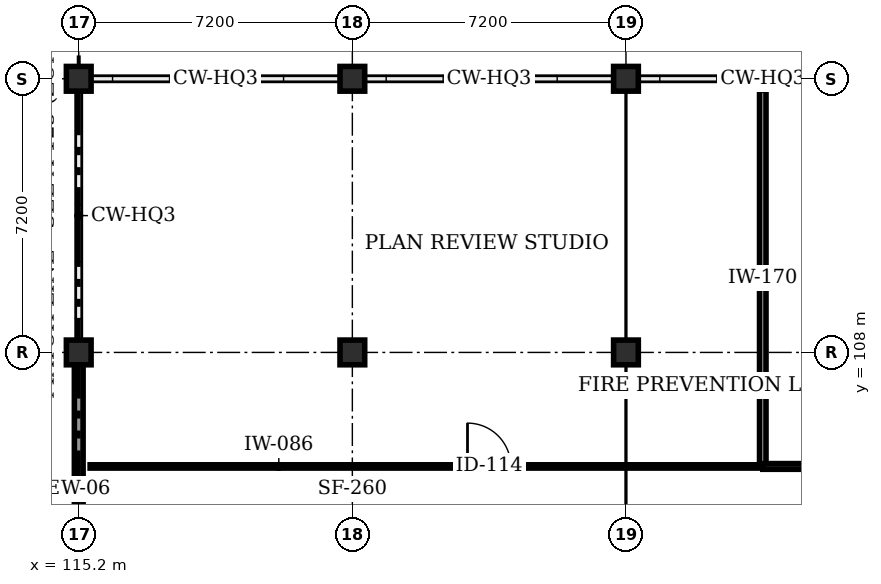
"""IFC4 building model, lengths in metres.
Left out: names, types, materials, properties, quantities, classifications, styles, units other than length and angle.
Written with IfcOpenShell. Run it as: python <this file> out.ifc"""

import sys

from ifc_helpers import new_model, si_unit, direction, frame, frame_2d, origin, origin_2d, place, context, subcontext, project, spatial, rectangle, extrude, element, fill, save


model = new_model("IFC4")
c1 = context("Model", 3, precision=1e-05, world=origin(), true_north=direction((0.0, 1.0)))
c2 = subcontext(c1, "Body", "Model", "MODEL_VIEW")
j1 = project(units=[si_unit("LENGTHUNIT", "METRE"), si_unit("PLANEANGLEUNIT", "RADIAN")], contexts=[c1])
p1 = place(None, origin())
s1 = spatial("IfcSite", under=j1, at=p1, CompositionType="ELEMENT")
p2 = place(p1, origin())
s2 = spatial("IfcBuilding", under=s1, at=p2, CompositionType="ELEMENT")
p3 = place(p2, frame((0.0, 0.0, 10.2)))
s3 = spatial("IfcBuildingStorey", under=s2, at=p3, CompositionType="ELEMENT", Elevation=10.2)
for number, where, z_axis, x_axis in (
    (1, (115.2, 108.0, 0.0), (0.0, 0.0, 1.0), (1.0, 0.0, 0.0)),
    (2, (115.2, 115.2, 0.0), (0.0, 0.0, 1.0), (1.0, 0.0, 0.0)),
    (3, (122.4, 108.0, 0.0), (0.0, 0.0, 1.0), (1.0, 0.0, 0.0)),
    (4, (122.4, 115.2, 0.0), (0.0, 0.0, 1.0), (1.0, 0.0, 0.0)),
    (5, (129.6, 108.0, 0.0), (0.0, 0.0, 1.0), (1.0, 0.0, 0.0)),
    (6, (129.6, 115.2, 0.0), (0.0, 0.0, 1.0), (1.0, 0.0, 0.0)),
):
    element("IfcColumn", number, at=place(p3, frame(where, z_axis=z_axis, x_axis=x_axis)), inside=s3, PredefinedType="COLUMN", context=c2, shape_type="SweptSolid", body=[
        extrude(rectangle(XDim=0.65, YDim=0.65, at=origin_2d()), origin(), (0.0, 0.0, 1.0), 4.2),
    ])
p4 = place(p3, frame((115.2, 108.0, 0.0), z_axis=(0.0, 0.0, 1.0), x_axis=(0.0, -1.0, 0.0)))
e7 = element("IfcWall", 7, at=p4, inside=s3, PredefinedType="STANDARD", context=c2, shape_type="SweptSolid", body=[
    extrude(rectangle(XDim=7.2, YDim=0.23, at=frame_2d((3.6, 0.0))), origin(), (0.0, 0.0, 1.0), 3.25),
])
p5 = place(p3, frame((115.5, 105.0, 0.0), z_axis=(0.0, 0.0, 1.0), x_axis=(1.0, 0.0, 0.0)))
e8 = element("IfcWall", 8, at=p5, inside=s3, PredefinedType="STANDARD", context=c2, shape_type="SweptSolid", body=[
    extrude(rectangle(XDim=17.7, YDim=0.086, at=frame_2d((8.85, 0.0))), origin(), (0.0, 0.0, 1.0), 3.338),
])
p6 = place(p5, frame((9.93, 0.0, 0.0)))
e9 = element("IfcOpeningElement", 9, at=p6, cuts=e8, PredefinedType="OPENING", context=c2, shape_type="SweptSolid", body=[
    extrude(rectangle(XDim=1.14, YDim=2.2, at=frame_2d((0.57, 1.1))), frame((0.0, 0.053, 0.0), z_axis=(0.0, -1.0, 0.0), x_axis=(1.0, 0.0, 0.0)), (0.0, 0.0, 1.0), 0.106),
])
p7 = place(p3, frame((133.2, 105.0, 0.0), z_axis=(0.0, 0.0, 1.0), x_axis=(0.0, 1.0, 0.0)))
e10 = element("IfcWall", 10, at=p7, inside=s3, PredefinedType="STANDARD", context=c2, shape_type="SweptSolid", body=[
    extrude(rectangle(XDim=9.9, YDim=0.17, at=frame_2d((4.95, 0.0))), origin(), (0.0, 0.0, 1.0), 3.257),
])
p8 = place(p3, frame((133.2, 105.0, 0.0), z_axis=(0.0, 0.0, 1.0), x_axis=(1.0, 0.0, 0.0)))
e11 = element("IfcWall", 11, at=p8, inside=s3, PredefinedType="STANDARD", context=c2, shape_type="SweptSolid", body=[
    extrude(rectangle(XDim=13.6, YDim=0.15, at=frame_2d((6.8, 0.0))), origin(), (0.0, 0.0, 1.0), 3.338),
])
p9 = place(p8, frame((6.65, 0.0, 0.0)))
e12 = element("IfcOpeningElement", 12, at=p9, cuts=e11, PredefinedType="OPENING", context=c2, shape_type="SweptSolid", body=[
    extrude(rectangle(XDim=1.1, YDim=2.2, at=frame_2d((0.55, 1.1))), frame((0.0, 0.085, 0.0), z_axis=(0.0, -1.0, 0.0), x_axis=(1.0, 0.0, 0.0)), (0.0, 0.0, 1.0), 0.17),
])
p10 = place(p6, origin())
e13 = element("IfcDoor", 13, at=p10, inside=s3, OperationType="SINGLE_SWING_LEFT", PredefinedType="DOOR", context=c2, shape_type="SweptSolid", body=[
    extrude(rectangle(XDim=1.14, YDim=2.2, at=frame_2d((0.57, 1.1))), frame((0.0, 0.025, 0.0), z_axis=(0.0, -1.0, 0.0), x_axis=(1.0, 0.0, 0.0)), (0.0, 0.0, 1.0), 0.05),
])
fill(e9, e13)
save(model, sys.argv[1])
